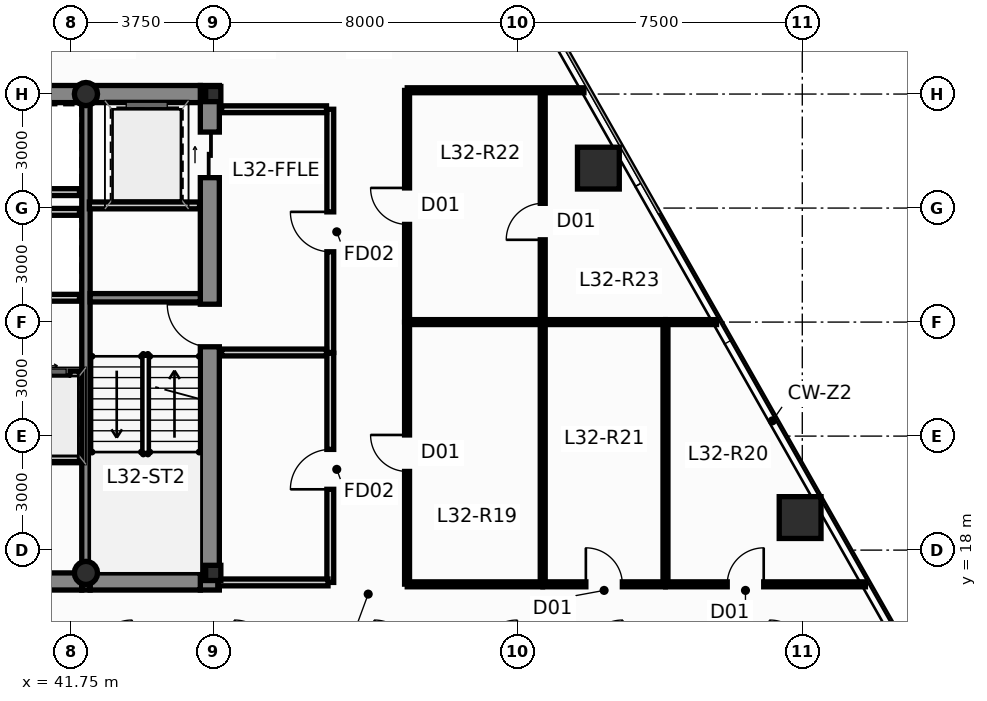
"""IFC4 building model, lengths in metres.
Left out: names, types, materials, properties, quantities, classifications, styles, units other than length and angle.
Written with IfcOpenShell. Run it as: python <this file> out.ifc"""

import sys

from ifc_helpers import new_model, si_unit, direction, frame, frame_2d, origin, origin_2d, place, context, subcontext, project, spatial, rectangle, hollow_rectangle, hollow_circle, i_section, extrude, source, transform, mapped, element, fill, save


model = new_model("IFC4")
c1 = context("Model", 3, precision=1e-05, world=origin(), true_north=direction((0.0, 1.0)))
c2 = subcontext(c1, "Body", "Model", "MODEL_VIEW")
j1 = project(units=[si_unit("LENGTHUNIT", "METRE"), si_unit("PLANEANGLEUNIT", "RADIAN")], contexts=[c1])
p1 = place(None, origin())
s1 = spatial("IfcSite", under=j1, at=p1, CompositionType="ELEMENT")
p2 = place(p1, origin())
s2 = spatial("IfcBuilding", under=s1, at=p2, CompositionType="ELEMENT")
p3 = place(p2, frame((0.0, 0.0, 123.65)))
s3 = spatial("IfcBuildingStorey", under=s2, at=p3, CompositionType="ELEMENT", Elevation=123.65)
m1 = source(origin(), c2, "Body", "SweptSolid", [
    extrude(i_section(OverallWidth=0.4, OverallDepth=0.4, WebThickness=0.02, FlangeThickness=0.032, at=origin_2d()), origin(), (0.0, 0.0, 1.0), 3.65),
])
for number, where, z_axis, x_axis in (
    (1, (45.5, 17.4, 0.0), (0.0, 0.0, 1.0), (1.0, 0.0, 0.0)),
    (2, (45.5, 30.0, 0.0), (0.0, 0.0, 1.0), (1.0, 0.0, 0.0)),
):
    element("IfcColumn", number, at=place(p3, frame(where, z_axis=z_axis, x_axis=x_axis)), inside=s3, PredefinedType="COLUMN", context=c2, shape_type="MappedRepresentation", body=[
        mapped(m1, transform((0.0, 0.0, 0.0), scale=1.0)),
    ])
m2 = source(origin(), c2, "Body", "SweptSolid", [
    extrude(hollow_circle(Radius=0.305, WallThickness=0.025, at=origin_2d()), origin(), (0.0, 0.0, 1.0), 3.65),
])
for number, where, z_axis, x_axis in (
    (3, (42.15, 17.4, 0.0), (0.0, 0.0, 1.0), (1.0, 0.0, 0.0)),
    (4, (42.15, 30.0, 0.0), (0.0, 0.0, 1.0), (1.0, 0.0, 0.0)),
):
    element("IfcColumn", number, at=place(p3, frame(where, z_axis=z_axis, x_axis=x_axis)), inside=s3, PredefinedType="COLUMN", context=c2, shape_type="MappedRepresentation", body=[
        mapped(m2, transform((0.0, 0.0, 0.0), scale=1.0)),
    ])
p4 = place(p3, frame((45.41, 16.95, 0.0), z_axis=(0.0, 0.0, 1.0), x_axis=(0.0, 1.0, 0.0)))
e5 = element("IfcWall", 5, at=p4, inside=s3, PredefinedType="SHEAR", context=c2, shape_type="SweptSolid", body=[
    extrude(rectangle(XDim=13.275, YDim=0.5, at=frame_2d((6.638, 0.0))), origin(), (0.0, 0.0, 1.0), 3.65),
])
p5 = place(p4, frame((6.4, 0.0, 0.0)))
e6 = element("IfcOpeningElement", 6, at=p5, cuts=e5, PredefinedType="OPENING", context=c2, shape_type="SweptSolid", body=[
    extrude(rectangle(XDim=1.12, YDim=2.15, at=frame_2d((0.56, 1.075))), frame((0.0, 0.262, 0.0), z_axis=(0.0, -1.0, 0.0), x_axis=(1.0, 0.0, 0.0)), (0.0, 0.0, 1.0), 0.524),
])
p6 = place(p4, frame((10.85, 0.0, 0.0)))
e7 = element("IfcOpeningElement", 7, at=p6, cuts=e5, PredefinedType="OPENING", context=c2, shape_type="SweptSolid", body=[
    extrude(rectangle(XDim=1.2, YDim=2.2, at=frame_2d((0.6, 1.1))), frame((0.0, 0.262, 0.0), z_axis=(0.0, -1.0, 0.0), x_axis=(1.0, 0.0, 0.0)), (0.0, 0.0, 1.0), 0.524),
])
p7 = place(p3, frame((33.96, 17.175, 0.0), z_axis=(0.0, 0.0, 1.0), x_axis=(1.0, 0.0, 0.0)))
e8 = element("IfcWall", 8, at=p7, inside=s3, PredefinedType="SHEAR", context=c2, shape_type="SweptSolid", body=[
    extrude(rectangle(XDim=8.08, YDim=0.45, at=frame_2d((4.04, 0.0))), origin(), (0.0, 0.0, 1.0), 3.65),
])
p8 = place(p3, frame((42.26, 17.175, 0.0), z_axis=(0.0, 0.0, 1.0), x_axis=(1.0, 0.0, 0.0)))
e9 = element("IfcWall", 9, at=p8, inside=s3, PredefinedType="SHEAR", context=c2, shape_type="SweptSolid", body=[
    extrude(rectangle(XDim=2.9, YDim=0.45, at=frame_2d((1.45, 0.0))), origin(), (0.0, 0.0, 1.0), 3.65),
])
p9 = place(p3, frame((40.16, 30.0, 0.0), z_axis=(0.0, 0.0, 1.0), x_axis=(1.0, 0.0, 0.0)))
e10 = element("IfcWall", 10, at=p9, inside=s3, PredefinedType="SHEAR", context=c2, shape_type="SweptSolid", body=[
    extrude(rectangle(XDim=1.88, YDim=0.45, at=frame_2d((0.94, 0.0))), origin(), (0.0, 0.0, 1.0), 3.65),
])
p10 = place(p3, frame((42.26, 30.0, 0.0), z_axis=(0.0, 0.0, 1.0), x_axis=(1.0, 0.0, 0.0)))
e11 = element("IfcWall", 11, at=p10, inside=s3, PredefinedType="SHEAR", context=c2, shape_type="SweptSolid", body=[
    extrude(rectangle(XDim=2.9, YDim=0.45, at=frame_2d((1.45, 0.0))), origin(), (0.0, 0.0, 1.0), 3.65),
])
p11 = place(p3, frame((42.15, 16.95, 0.0), z_axis=(0.0, 0.0, 1.0), x_axis=(0.0, 1.0, 0.0)))
e12 = element("IfcWall", 12, at=p11, inside=s3, PredefinedType="SHEAR", context=c2, shape_type="SweptSolid", body=[
    extrude(rectangle(XDim=13.275, YDim=0.22, at=frame_2d((6.638, 0.0))), origin(), (0.0, 0.0, 1.0), 3.65),
])
p12 = place(p3, frame((42.26, 24.64, 0.0), z_axis=(0.0, 0.0, 1.0), x_axis=(1.0, 0.0, 0.0)))
e13 = element("IfcWall", 13, at=p12, inside=s3, PredefinedType="SHEAR", context=c2, shape_type="SweptSolid", body=[
    extrude(rectangle(XDim=2.9, YDim=0.22, at=frame_2d((1.45, 0.0))), origin(), (0.0, 0.0, 1.0), 3.65),
])
m3 = source(origin(), c2, "Body", "SweptSolid", [
    extrude(hollow_rectangle(XDim=1.1, YDim=1.1, WallThickness=0.06, at=origin_2d()), origin(), (0.0, 0.0, 1.0), 3.651),
])
p13 = place(p3, frame((60.943, 18.856, 0.0), z_axis=(-0.010431083049, -0.021597691184, 0.999712324742), x_axis=(0.900476348161, -0.434904985489, 0.0)))
e14 = element("IfcColumn", 14, at=p13, inside=s3, PredefinedType="COLUMN", context=c2, shape_type="MappedRepresentation", body=[
    mapped(m3, transform((0.0, 0.0, 0.0), scale=1.0)),
])
m4 = source(origin(), c2, "Body", "SweptSolid", [
    extrude(hollow_rectangle(XDim=1.1, YDim=1.1, WallThickness=0.06, at=origin_2d()), origin(), (0.0, 0.0, 1.0), 3.651),
])
p14 = place(p3, frame((55.635, 28.051, 0.0), z_axis=(-0.014912316331, -0.013775502979, 0.999793907933), x_axis=(0.678553674548, -0.734550822447, 0.0)))
e15 = element("IfcColumn", 15, at=p14, inside=s3, PredefinedType="COLUMN", context=c2, shape_type="MappedRepresentation", body=[
    mapped(m4, transform((0.0, 0.0, 0.0), scale=1.0)),
])
p15 = place(p3, frame((40.28, 22.62, 0.0), z_axis=(0.0, 0.0, 1.0), x_axis=(1.0, 0.0, 0.0)))
e16 = element("IfcWall", 16, at=p15, inside=s3, PredefinedType="PARTITIONING", context=c2, shape_type="SweptSolid", body=[
    extrude(rectangle(XDim=1.7, YDim=0.18, at=frame_2d((0.85, 0.0))), origin(), (0.0, 0.0, 1.0), 3.4),
])
p16 = place(p15, frame((0.35, 0.0, 0.0)))
e17 = element("IfcOpeningElement", 17, at=p16, cuts=e16, PredefinedType="OPENING", context=c2, shape_type="SweptSolid", body=[
    extrude(rectangle(XDim=1.1, YDim=2.2, at=frame_2d((0.55, 1.1))), frame((0.0, 0.102, 0.0), z_axis=(0.0, -1.0, 0.0), x_axis=(1.0, 0.0, 0.0)), (0.0, 0.0, 1.0), 0.204),
])
p17 = place(p3, frame((40.28, 26.9, 0.0), z_axis=(0.0, 0.0, 1.0), x_axis=(1.0, 0.0, 0.0)))
e18 = element("IfcWall", 18, at=p17, inside=s3, PredefinedType="PARTITIONING", context=c2, shape_type="SweptSolid", body=[
    extrude(rectangle(XDim=1.7, YDim=0.18, at=frame_2d((0.85, 0.0))), origin(), (0.0, 0.0, 1.0), 3.4),
])
p18 = place(p3, frame((40.2, 24.64, 0.0), z_axis=(0.0, 0.0, 1.0), x_axis=(1.0, 0.0, 0.0)))
e19 = element("IfcWall", 19, at=p18, inside=s3, PredefinedType="PARTITIONING", context=c2, shape_type="SweptSolid", body=[
    extrude(rectangle(XDim=1.78, YDim=0.18, at=frame_2d((0.89, 0.0))), origin(), (0.0, 0.0, 1.0), 3.4),
])
p19 = place(p3, frame((40.22, 27.42, 0.0), z_axis=(0.0, 0.0, 1.0), x_axis=(1.0, 0.0, 0.0)))
e20 = element("IfcWall", 20, at=p19, inside=s3, PredefinedType="PARTITIONING", context=c2, shape_type="SweptSolid", body=[
    extrude(rectangle(XDim=1.76, YDim=0.18, at=frame_2d((0.88, 0.0))), origin(), (0.0, 0.0, 1.0), 3.4),
])
p20 = place(p3, frame((48.58, 23.2, 0.0), z_axis=(0.0, 0.0, 1.0), x_axis=(0.0, 1.0, 0.0)))
e21 = element("IfcWall", 21, at=p20, inside=s3, PredefinedType="PARTITIONING", context=c2, shape_type="SweptSolid", body=[
    extrude(rectangle(XDim=6.4, YDim=0.18, at=frame_2d((3.2, 0.0))), origin(), (0.0, 0.0, 1.0), 3.027),
])
p21 = place(p20, frame((2.65, 0.0, 0.0)))
e22 = element("IfcOpeningElement", 22, at=p21, cuts=e21, PredefinedType="OPENING", context=c2, shape_type="SweptSolid", body=[
    extrude(rectangle(XDim=1.05, YDim=2.15, at=frame_2d((0.525, 1.075))), frame((0.0, 0.102, 0.0), z_axis=(0.0, -1.0, 0.0), x_axis=(1.0, 0.0, 0.0)), (0.0, 0.0, 1.0), 0.204),
])
p22 = place(p3, frame((45.72, 23.2, 0.0), z_axis=(0.0, 0.0, 1.0), x_axis=(1.0, 0.0, 0.0)))
e23 = element("IfcWall", 23, at=p22, inside=s3, PredefinedType="PARTITIONING", context=c2, shape_type="SweptSolid", body=[
    extrude(rectangle(XDim=2.76, YDim=0.18, at=frame_2d((1.38, 0.0))), origin(), (0.0, 0.0, 1.0), 3.4),
])
p23 = place(p3, frame((45.72, 29.6, 0.0), z_axis=(0.0, 0.0, 1.0), x_axis=(1.0, 0.0, 0.0)))
e24 = element("IfcWall", 24, at=p23, inside=s3, PredefinedType="PARTITIONING", context=c2, shape_type="SweptSolid", body=[
    extrude(rectangle(XDim=2.76, YDim=0.18, at=frame_2d((1.38, 0.0))), origin(), (0.0, 0.0, 1.0), 2.783),
])
p24 = place(p3, frame((42.24, 27.07, 0.0), z_axis=(0.0, 0.0, 1.0), x_axis=(1.0, 0.0, 0.0)))
e25 = element("IfcWall", 25, at=p24, inside=s3, PredefinedType="PARTITIONING", context=c2, shape_type="SweptSolid", body=[
    extrude(rectangle(XDim=2.9, YDim=0.18, at=frame_2d((1.45, 0.0))), origin(), (0.0, 0.0, 1.0), 3.4),
])
p25 = place(p3, frame((40.22, 20.42, 0.0), z_axis=(0.0, 0.0, 1.0), x_axis=(1.0, 0.0, 0.0)))
e26 = element("IfcWall", 26, at=p25, inside=s3, PredefinedType="PARTITIONING", context=c2, shape_type="SweptSolid", body=[
    extrude(rectangle(XDim=1.76, YDim=0.18, at=frame_2d((0.88, 0.0))), origin(), (0.0, 0.0, 1.0), 3.4),
])
p26 = place(p3, frame((48.58, 17.15, 0.0), z_axis=(0.0, 0.0, 1.0), x_axis=(0.0, 1.0, 0.0)))
e27 = element("IfcWall", 27, at=p26, inside=s3, PredefinedType="PARTITIONING", context=c2, shape_type="SweptSolid", body=[
    extrude(rectangle(XDim=6.03, YDim=0.18, at=frame_2d((3.015, 0.0))), origin(), (0.0, 0.0, 1.0), 3.027),
])
p27 = place(p26, frame((2.45, 0.0, 0.0)))
e28 = element("IfcOpeningElement", 28, at=p27, cuts=e27, PredefinedType="OPENING", context=c2, shape_type="SweptSolid", body=[
    extrude(rectangle(XDim=1.05, YDim=2.15, at=frame_2d((0.525, 1.075))), frame((0.0, 0.102, 0.0), z_axis=(0.0, -1.0, 0.0), x_axis=(1.0, 0.0, 0.0)), (0.0, 0.0, 1.0), 0.204),
])
p28 = place(p3, frame((45.62, 17.15, 0.0), z_axis=(0.0, 0.0, 1.0), x_axis=(1.0, 0.0, 0.0)))
e29 = element("IfcWall", 29, at=p28, inside=s3, PredefinedType="PARTITIONING", context=c2, shape_type="SweptSolid", body=[
    extrude(rectangle(XDim=2.9, YDim=0.18, at=frame_2d((1.45, 0.0))), origin(), (0.0, 0.0, 1.0), 2.783),
])
p29 = place(p3, frame((50.6, 17.105, 0.0), z_axis=(0.0, 0.0, 1.0), x_axis=(0.0, 1.0, 0.0)))
e30 = element("IfcWall", 30, at=p29, inside=s3, PredefinedType="PARTITIONING", context=c2, shape_type="SweptSolid", body=[
    extrude(rectangle(XDim=6.89, YDim=0.13, at=frame_2d((3.445, 0.0))), origin(), (0.0, 0.0, 1.0), 3.027),
])
p30 = place(p29, frame((2.965, 0.0, 0.0)))
e31 = element("IfcOpeningElement", 31, at=p30, cuts=e30, PredefinedType="OPENING", context=c2, shape_type="SweptSolid", body=[
    extrude(rectangle(XDim=0.96, YDim=2.15, at=frame_2d((0.48, 1.075))), frame((0.0, 0.077, 0.0), z_axis=(0.0, -1.0, 0.0), x_axis=(1.0, 0.0, 0.0)), (0.0, 0.0, 1.0), 0.154),
])
p31 = place(p3, frame((54.17, 17.105, 0.0), z_axis=(0.0, 0.0, 1.0), x_axis=(0.0, 1.0, 0.0)))
e32 = element("IfcWall", 32, at=p31, inside=s3, PredefinedType="PARTITIONING", context=c2, shape_type="SweptSolid", body=[
    extrude(rectangle(XDim=6.89, YDim=0.13, at=frame_2d((3.445, 0.0))), origin(), (0.0, 0.0, 1.0), 3.027),
])
p32 = place(p3, frame((57.4, 17.105, 0.0), z_axis=(0.0, 0.0, 1.0), x_axis=(0.0, 1.0, 0.0)))
e33 = element("IfcWall", 33, at=p32, inside=s3, PredefinedType="PARTITIONING", context=c2, shape_type="SweptSolid", body=[
    extrude(rectangle(XDim=6.89, YDim=0.13, at=frame_2d((3.445, 0.0))), origin(), (0.0, 0.0, 1.0), 3.4),
])
p33 = place(p3, frame((50.6, 24.005, 0.0), z_axis=(0.0, 0.0, 1.0), x_axis=(0.0, 1.0, 0.0)))
e34 = element("IfcWall", 34, at=p33, inside=s3, PredefinedType="PARTITIONING", context=c2, shape_type="SweptSolid", body=[
    extrude(rectangle(XDim=6.09, YDim=0.13, at=frame_2d((3.045, 0.0))), origin(), (0.0, 0.0, 1.0), 3.027),
])
p34 = place(p33, frame((2.565, 0.0, 0.0)))
e35 = element("IfcOpeningElement", 35, at=p34, cuts=e34, PredefinedType="OPENING", context=c2, shape_type="SweptSolid", body=[
    extrude(rectangle(XDim=0.96, YDim=2.15, at=frame_2d((0.48, 1.075))), frame((0.0, 0.077, 0.0), z_axis=(0.0, -1.0, 0.0), x_axis=(1.0, 0.0, 0.0)), (0.0, 0.0, 1.0), 0.154),
])
p35 = place(p3, frame((54.17, 24.005, 0.0), z_axis=(0.0, 0.0, 1.0), x_axis=(0.0, 1.0, 0.0)))
e36 = element("IfcWall", 36, at=p35, inside=s3, PredefinedType="PARTITIONING", context=c2, shape_type="SweptSolid", body=[
    extrude(rectangle(XDim=6.09, YDim=0.13, at=frame_2d((3.045, 0.0))), origin(), (0.0, 0.0, 1.0), 3.027),
])
p36 = place(p35, frame((2.16, 0.0, 0.0)))
e37 = element("IfcOpeningElement", 37, at=p36, cuts=e36, PredefinedType="OPENING", context=c2, shape_type="SweptSolid", body=[
    extrude(rectangle(XDim=0.96, YDim=2.15, at=frame_2d((0.48, 1.075))), frame((0.0, 0.077, 0.0), z_axis=(0.0, -1.0, 0.0), x_axis=(1.0, 0.0, 0.0)), (0.0, 0.0, 1.0), 0.154),
])
p37 = place(p3, frame((57.405, 17.1, 0.0), z_axis=(0.0, 0.0, 1.0), x_axis=(1.0, 0.0, 0.0)))
e38 = element("IfcWall", 38, at=p37, inside=s3, PredefinedType="PARTITIONING", context=c2, shape_type="SweptSolid", body=[
    extrude(rectangle(XDim=5.255, YDim=0.13, at=frame_2d((2.627, 0.0))), origin(), (0.0, 0.0, 1.0), 3.4),
])
p38 = place(p37, frame((1.62, 0.0, 0.0)))
e39 = element("IfcOpeningElement", 39, at=p38, cuts=e38, PredefinedType="OPENING", context=c2, shape_type="SweptSolid", body=[
    extrude(rectangle(XDim=0.96, YDim=2.15, at=frame_2d((0.48, 1.075))), frame((0.0, 0.077, 0.0), z_axis=(0.0, -1.0, 0.0), x_axis=(1.0, 0.0, 0.0)), (0.0, 0.0, 1.0), 0.154),
])
p39 = place(p3, frame((50.605, 30.1, 0.0), z_axis=(0.0, 0.0, 1.0), x_axis=(1.0, 0.0, 0.0)))
e40 = element("IfcWall", 40, at=p39, inside=s3, PredefinedType="PARTITIONING", context=c2, shape_type="SweptSolid", body=[
    extrude(rectangle(XDim=4.649, YDim=0.13, at=frame_2d((2.325, 0.0))), origin(), (0.0, 0.0, 1.0), 3.4),
])
for number, where, z_axis, x_axis in (
    (41, (54.165, 17.1, 0.0), (0.0, 0.0, 1.0), (-1.0, 0.0, 0.0)),
    (42, (50.605, 24.0, 0.0), (0.0, 0.0, 1.0), (1.0, 0.0, 0.0)),
):
    element("IfcWall", number, at=place(p3, frame(where, z_axis=z_axis, x_axis=x_axis)), inside=s3, PredefinedType="PARTITIONING", context=c2, shape_type="SweptSolid", body=[
        extrude(rectangle(XDim=3.56, YDim=0.13, at=frame_2d((1.78, 0.0))), origin(), (0.0, 0.0, 1.0), 3.4),
    ])
p40 = place(p3, frame((54.175, 17.1, 0.0), z_axis=(0.0, 0.0, 1.0), x_axis=(1.0, 0.0, 0.0)))
e43 = element("IfcWall", 43, at=p40, inside=s3, PredefinedType="PARTITIONING", context=c2, shape_type="SweptSolid", body=[
    extrude(rectangle(XDim=3.22, YDim=0.13, at=frame_2d((1.61, 0.0))), origin(), (0.0, 0.0, 1.0), 3.4),
])
p41 = place(p40, frame((1.13, 0.0, 0.0)))
e44 = element("IfcOpeningElement", 44, at=p41, cuts=e43, PredefinedType="OPENING", context=c2, shape_type="SweptSolid", body=[
    extrude(rectangle(XDim=0.96, YDim=2.15, at=frame_2d((0.48, 1.075))), frame((0.0, 0.077, 0.0), z_axis=(0.0, -1.0, 0.0), x_axis=(1.0, 0.0, 0.0)), (0.0, 0.0, 1.0), 0.154),
])
p42 = place(p3, frame((54.175, 24.0, 0.0), z_axis=(0.0, 0.0, 1.0), x_axis=(1.0, 0.0, 0.0)))
e45 = element("IfcWall", 45, at=p42, inside=s3, PredefinedType="PARTITIONING", context=c2, shape_type="SweptSolid", body=[
    extrude(rectangle(XDim=3.22, YDim=0.13, at=frame_2d((1.61, 0.0))), origin(), (0.0, 0.0, 1.0), 3.4),
])
p43 = place(p3, frame((57.405, 24.0, 0.0), z_axis=(0.0, 0.0, 1.0), x_axis=(1.0, 0.0, 0.0)))
e46 = element("IfcWall", 46, at=p43, inside=s3, PredefinedType="PARTITIONING", context=c2, shape_type="SweptSolid", body=[
    extrude(rectangle(XDim=1.338, YDim=0.13, at=frame_2d((0.669, 0.0))), origin(), (0.0, 0.0, 1.0), 3.4),
])
p44 = place(p5, origin())
e47 = element("IfcDoor", 47, at=p44, inside=s3, OperationType="SINGLE_SWING_RIGHT", PredefinedType="DOOR", context=c2, shape_type="SweptSolid", body=[
    extrude(rectangle(XDim=1.12, YDim=2.15, at=frame_2d((0.56, 1.075))), frame((0.0, 0.025, 0.0), z_axis=(0.0, -1.0, 0.0), x_axis=(1.0, 0.0, 0.0)), (0.0, 0.0, 1.0), 0.05),
])
fill(e6, e47)
p45 = place(p6, origin())
e48 = element("IfcDoor", 48, at=p45, inside=s3, OperationType="SLIDING_TO_RIGHT", PredefinedType="DOOR", context=c2, shape_type="SweptSolid", body=[
    extrude(rectangle(XDim=1.2, YDim=2.2, at=frame_2d((0.6, 1.1))), frame((0.0, 0.025, 0.0), z_axis=(0.0, -1.0, 0.0), x_axis=(1.0, 0.0, 0.0)), (0.0, 0.0, 1.0), 0.05),
])
fill(e7, e48)
p46 = place(p16, origin())
e49 = element("IfcDoor", 49, at=p46, inside=s3, OperationType="SLIDING_TO_LEFT", PredefinedType="DOOR", context=c2, shape_type="SweptSolid", body=[
    extrude(rectangle(XDim=1.1, YDim=2.2, at=frame_2d((0.55, 1.1))), frame((0.0, 0.025, 0.0), z_axis=(0.0, -1.0, 0.0), x_axis=(1.0, 0.0, 0.0)), (0.0, 0.0, 1.0), 0.05),
])
fill(e17, e49)
p47 = place(p21, origin())
e50 = element("IfcDoor", 50, at=p47, inside=s3, OperationType="SINGLE_SWING_RIGHT", PredefinedType="DOOR", context=c2, shape_type="SweptSolid", body=[
    extrude(rectangle(XDim=1.05, YDim=2.15, at=frame_2d((0.525, 1.075))), frame((0.0, 0.025, 0.0), z_axis=(0.0, -1.0, 0.0), x_axis=(1.0, 0.0, 0.0)), (0.0, 0.0, 1.0), 0.05),
])
fill(e22, e50)
p48 = place(p27, origin())
e51 = element("IfcDoor", 51, at=p48, inside=s3, OperationType="SINGLE_SWING_LEFT", PredefinedType="DOOR", context=c2, shape_type="SweptSolid", body=[
    extrude(rectangle(XDim=1.05, YDim=2.15, at=frame_2d((0.525, 1.075))), frame((0.0, 0.025, 0.0), z_axis=(0.0, -1.0, 0.0), x_axis=(1.0, 0.0, 0.0)), (0.0, 0.0, 1.0), 0.05),
])
fill(e28, e51)
p49 = place(p30, origin())
e52 = element("IfcDoor", 52, at=p49, inside=s3, OperationType="SINGLE_SWING_RIGHT", PredefinedType="DOOR", context=c2, shape_type="SweptSolid", body=[
    extrude(rectangle(XDim=0.96, YDim=2.15, at=frame_2d((0.48, 1.075))), frame((0.0, 0.025, 0.0), z_axis=(0.0, -1.0, 0.0), x_axis=(1.0, 0.0, 0.0)), (0.0, 0.0, 1.0), 0.05),
])
fill(e31, e52)
p50 = place(p34, origin())
e53 = element("IfcDoor", 53, at=p50, inside=s3, OperationType="SINGLE_SWING_RIGHT", PredefinedType="DOOR", context=c2, shape_type="SweptSolid", body=[
    extrude(rectangle(XDim=0.96, YDim=2.15, at=frame_2d((0.48, 1.075))), frame((0.0, 0.025, 0.0), z_axis=(0.0, -1.0, 0.0), x_axis=(1.0, 0.0, 0.0)), (0.0, 0.0, 1.0), 0.05),
])
fill(e35, e53)
p51 = place(p36, origin())
e54 = element("IfcDoor", 54, at=p51, inside=s3, OperationType="SINGLE_SWING_LEFT", PredefinedType="DOOR", context=c2, shape_type="SweptSolid", body=[
    extrude(rectangle(XDim=0.96, YDim=2.15, at=frame_2d((0.48, 1.075))), frame((0.0, 0.025, 0.0), z_axis=(0.0, -1.0, 0.0), x_axis=(1.0, 0.0, 0.0)), (0.0, 0.0, 1.0), 0.05),
])
fill(e37, e54)
p52 = place(p38, origin())
e55 = element("IfcDoor", 55, at=p52, inside=s3, OperationType="SINGLE_SWING_RIGHT", PredefinedType="DOOR", context=c2, shape_type="SweptSolid", body=[
    extrude(rectangle(XDim=0.96, YDim=2.15, at=frame_2d((0.48, 1.075))), frame((0.0, 0.025, 0.0), z_axis=(0.0, -1.0, 0.0), x_axis=(1.0, 0.0, 0.0)), (0.0, 0.0, 1.0), 0.05),
])
fill(e39, e55)
p53 = place(p41, origin())
e56 = element("IfcDoor", 56, at=p53, inside=s3, OperationType="SINGLE_SWING_LEFT", PredefinedType="DOOR", context=c2, shape_type="SweptSolid", body=[
    extrude(rectangle(XDim=0.96, YDim=2.15, at=frame_2d((0.48, 1.075))), frame((0.0, 0.025, 0.0), z_axis=(0.0, -1.0, 0.0), x_axis=(1.0, 0.0, 0.0)), (0.0, 0.0, 1.0), 0.05),
])
fill(e44, e56)
save(model, sys.argv[1])
